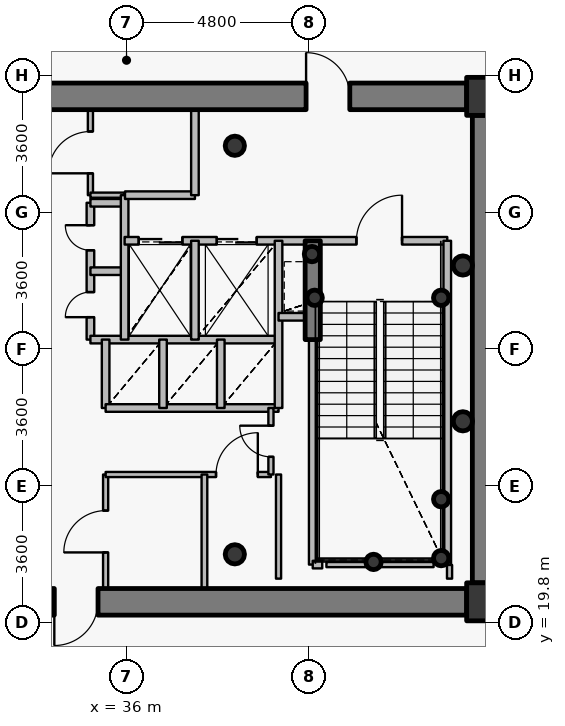
"""IFC4 building model, lengths in metres.
Left out: names, types, materials, properties, quantities, classifications, styles, units other than length and angle.
Written with IfcOpenShell. Run it as: python <this file> out.ifc"""

import sys

from ifc_helpers import new_model, si_unit, direction, frame, frame_2d, origin, origin_2d, place, context, subcontext, project, spatial, rectangle, hollow_circle, extrude, source, transform, mapped, element, fill, save


model = new_model("IFC4")
c1 = context("Model", 3, precision=1e-05, world=origin(), true_north=direction((0.0, 1.0)))
c2 = subcontext(c1, "Body", "Model", "MODEL_VIEW")
j1 = project(units=[si_unit("LENGTHUNIT", "METRE"), si_unit("PLANEANGLEUNIT", "RADIAN")], contexts=[c1])
p1 = place(None, origin())
s1 = spatial("IfcSite", under=j1, at=p1, CompositionType="ELEMENT")
p2 = place(p1, origin())
s2 = spatial("IfcBuilding", under=s1, at=p2, CompositionType="ELEMENT")
p3 = place(p2, frame((0.0, 0.0, 244.05)))
s3 = spatial("IfcBuildingStorey", under=s2, at=p3, CompositionType="ELEMENT", Elevation=244.05)
for number, where, z_axis, x_axis in (
    (1, (45.45, 20.35, 0.0), (0.0, 0.0, 1.0), (1.0, 0.0, 0.0)),
    (2, (45.45, 33.65, 0.0), (0.0, 0.0, 1.0), (1.0, 0.0, 0.0)),
):
    element("IfcColumn", number, at=place(p3, frame(where, z_axis=z_axis, x_axis=x_axis)), inside=s3, PredefinedType="COLUMN", context=c2, shape_type="SweptSolid", body=[
        extrude(rectangle(XDim=1.0, YDim=1.0, at=origin_2d()), origin(), (0.0, 0.0, 1.0), 3.75),
    ])
for number, where, z_axis, x_axis in (
    (3, (38.85, 21.6, 0.0), (0.0, 0.0, 1.0), (1.0, 0.0, 0.0)),
    (4, (38.85, 32.35, 0.0), (0.0, 0.0, 1.0), (1.0, 0.0, 0.0)),
):
    element("IfcColumn", number, at=place(p3, frame(where, z_axis=z_axis, x_axis=x_axis)), inside=s3, PredefinedType="COLUMN", context=c2, shape_type="SweptSolid", body=[
        extrude(hollow_circle(Radius=0.254, WallThickness=0.02, at=origin_2d()), origin(), (0.0, 0.0, 1.0), 3.75),
    ])
for number, where, z_axis, x_axis in (
    (5, (44.28, 21.5, 0.0), (0.0, 0.0, 1.0), (1.0, 0.0, 0.0)),
    (6, (44.28, 23.05, 0.0), (0.0, 0.0, 1.0), (1.0, 0.0, 0.0)),
    (7, (42.5, 21.4, 0.0), (0.0, 0.0, 1.0), (1.0, 0.0, 0.0)),
    (8, (40.95, 28.35, 0.0), (0.0, 0.0, 1.0), (1.0, 0.0, 0.0)),
    (9, (44.28, 28.35, 0.0), (0.0, 0.0, 1.0), (1.0, 0.0, 0.0)),
    (10, (40.88, 29.5, 0.0), (0.0, 0.0, 1.0), (1.0, 0.0, 0.0)),
):
    element("IfcColumn", number, at=place(p3, frame(where, z_axis=z_axis, x_axis=x_axis)), inside=s3, PredefinedType="COLUMN", context=c2, shape_type="SweptSolid", body=[
        extrude(hollow_circle(Radius=0.203, WallThickness=0.016, at=origin_2d()), origin(), (0.0, 0.0, 1.0), 3.75),
    ])
p4 = place(p3, frame((27.05, 33.65, 0.0), z_axis=(0.0, 0.0, 1.0), x_axis=(1.0, 0.0, 0.0)))
e11 = element("IfcWall", 11, at=p4, inside=s3, PredefinedType="SHEAR", context=c2, shape_type="SweptSolid", body=[
    extrude(rectangle(XDim=17.9, YDim=0.7, at=frame_2d((8.95, 0.0))), origin(), (0.0, 0.0, 1.0), 3.05),
])
p5 = place(p4, frame((13.675, 0.0, 0.0)))
e12 = element("IfcOpeningElement", 12, at=p5, cuts=e11, PredefinedType="OPENING", context=c2, shape_type="SweptSolid", body=[
    extrude(rectangle(XDim=1.15, YDim=2.15, at=origin_2d()), frame((0.575, 0.36, 1.075), z_axis=(0.0, -1.0, 0.0), x_axis=(1.0, 0.0, 0.0)), (0.0, 0.0, 1.0), 0.72),
])
p6 = place(p3, frame((45.45, 33.15, 0.0), z_axis=(0.0, 0.0, 1.0), x_axis=(0.0, -1.0, 0.0)))
e13 = element("IfcWall", 13, at=p6, inside=s3, PredefinedType="SHEAR", context=c2, shape_type="SweptSolid", body=[
    extrude(rectangle(XDim=12.3, YDim=0.7, at=frame_2d((6.15, 0.0))), origin(), (0.0, 0.0, 1.0), 3.05),
])
p7 = place(p3, frame((44.95, 20.35, 0.0), z_axis=(0.0, 0.0, 1.0), x_axis=(-1.0, 0.0, 0.0)))
e14 = element("IfcWall", 14, at=p7, inside=s3, PredefinedType="SHEAR", context=c2, shape_type="SweptSolid", body=[
    extrude(rectangle(XDim=17.9, YDim=0.7, at=frame_2d((8.95, 0.0))), origin(), (0.0, 0.0, 1.0), 3.05),
])
p8 = place(p7, frame((9.7, 0.0, 0.0)))
e15 = element("IfcOpeningElement", 15, at=p8, cuts=e14, PredefinedType="OPENING", context=c2, shape_type="SweptSolid", body=[
    extrude(rectangle(XDim=1.15, YDim=2.15, at=origin_2d()), frame((0.575, 0.36, 1.075), z_axis=(0.0, -1.0, 0.0), x_axis=(1.0, 0.0, 0.0)), (0.0, 0.0, 1.0), 0.72),
])
p9 = place(p3, frame((40.9, 27.25, 0.0), z_axis=(0.0, 0.0, 1.0), x_axis=(0.0, 1.0, 0.0)))
e16 = element("IfcWall", 16, at=p9, inside=s3, PredefinedType="SHEAR", context=c2, shape_type="SweptSolid", body=[
    extrude(rectangle(XDim=2.6, YDim=0.4, at=frame_2d((1.3, 0.0))), origin(), (0.0, 0.0, 1.0), 3.1),
])
for number, where, z_axis, x_axis in (
    (17, (44.85, 25.1, 0.0), (0.0, 0.0, 1.0), (1.0, 0.0, 0.0)),
    (18, (44.85, 29.2, 0.0), (0.0, 0.0, 1.0), (1.0, 0.0, 0.0)),
):
    element("IfcColumn", number, at=place(p3, frame(where, z_axis=z_axis, x_axis=x_axis)), inside=s3, PredefinedType="COLUMN", context=c2, shape_type="SweptSolid", body=[
        extrude(hollow_circle(Radius=0.254, WallThickness=0.02, at=origin_2d()), origin(), (0.0, 0.0, 1.0), 3.75),
    ])
p10 = place(p3, frame((35.05, 27.25, 0.0), z_axis=(0.0, 0.0, 1.0), x_axis=(0.0, 1.0, 0.0)))
e19 = element("IfcWall", 19, at=p10, inside=s3, PredefinedType="PARTITIONING", context=c2, shape_type="SweptSolid", body=[
    extrude(rectangle(XDim=3.6, YDim=0.2, at=frame_2d((1.8, 0.0))), origin(), (0.0, 0.0, 1.0), 3.5),
])
p11 = place(p10, frame((0.59, 0.0, 0.0)))
e20 = element("IfcOpeningElement", 20, at=p11, cuts=e19, PredefinedType="OPENING", context=c2, shape_type="SweptSolid", body=[
    extrude(rectangle(XDim=0.66, YDim=2.05, at=origin_2d()), frame((0.33, 0.11, 1.025), z_axis=(0.0, -1.0, 0.0), x_axis=(1.0, 0.0, 0.0)), (0.0, 0.0, 1.0), 0.22),
])
p12 = place(p10, frame((2.35, 0.0, 0.0)))
e21 = element("IfcOpeningElement", 21, at=p12, cuts=e19, PredefinedType="OPENING", context=c2, shape_type="SweptSolid", body=[
    extrude(rectangle(XDim=0.66, YDim=2.05, at=origin_2d()), frame((0.33, 0.11, 1.025), z_axis=(0.0, -1.0, 0.0), x_axis=(1.0, 0.0, 0.0)), (0.0, 0.0, 1.0), 0.22),
])
p13 = place(p3, frame((35.05, 27.25, 0.0), z_axis=(0.0, 0.0, 1.0), x_axis=(1.0, 0.0, 0.0)))
e22 = element("IfcWall", 22, at=p13, inside=s3, PredefinedType="PARTITIONING", context=c2, shape_type="SweptSolid", body=[
    extrude(rectangle(XDim=4.95, YDim=0.2, at=frame_2d((2.475, 0.0))), origin(), (0.0, 0.0, 1.0), 3.085),
])
for number, where, z_axis, x_axis in (
    (23, (35.05, 29.05, 0.0), (0.0, 0.0, 1.0), (1.0, 0.0, 0.0)),
    (24, (35.05, 30.85, 0.0), (0.0, 0.0, 1.0), (1.0, 0.0, 0.0)),
):
    element("IfcWall", number, at=place(p3, frame(where, z_axis=z_axis, x_axis=x_axis)), inside=s3, PredefinedType="PARTITIONING", context=c2, shape_type="SweptSolid", body=[
        extrude(rectangle(XDim=0.9, YDim=0.2, at=frame_2d((0.45, 0.0))), origin(), (0.0, 0.0, 1.0), 3.5),
    ])
p14 = place(p3, frame((35.05, 31.05, 0.0), z_axis=(0.0, 0.0, 1.0), x_axis=(0.0, 1.0, 0.0)))
e25 = element("IfcWall", 25, at=p14, inside=s3, PredefinedType="PARTITIONING", context=c2, shape_type="SweptSolid", body=[
    extrude(rectangle(XDim=2.25, YDim=0.135, at=frame_2d((1.125, 0.0))), origin(), (0.0, 0.0, 1.0), 3.085),
])
p15 = place(p14, frame((0.575, 0.0, 0.0)))
e26 = element("IfcOpeningElement", 26, at=p15, cuts=e25, PredefinedType="OPENING", context=c2, shape_type="SweptSolid", body=[
    extrude(rectangle(XDim=1.1, YDim=2.15, at=origin_2d()), frame((0.55, 0.078, 1.075), z_axis=(0.0, -1.0, 0.0), x_axis=(1.0, 0.0, 0.0)), (0.0, 0.0, 1.0), 0.155),
])
p16 = place(p3, frame((35.05, 31.05, 0.0), z_axis=(0.0, 0.0, 1.0), x_axis=(1.0, 0.0, 0.0)))
e27 = element("IfcWall", 27, at=p16, inside=s3, PredefinedType="PARTITIONING", context=c2, shape_type="SweptSolid", body=[
    extrude(rectangle(XDim=0.9, YDim=0.135, at=frame_2d((0.45, 0.0))), origin(), (0.0, 0.0, 1.0), 3.5),
])
p17 = place(p3, frame((35.45, 20.7, 0.0), z_axis=(0.0, 0.0, 1.0), x_axis=(0.0, 1.0, 0.0)))
e28 = element("IfcWall", 28, at=p17, inside=s3, PredefinedType="PARTITIONING", context=c2, shape_type="SweptSolid", body=[
    extrude(rectangle(XDim=3.0, YDim=0.135, at=frame_2d((1.5, 0.0))), origin(), (0.0, 0.0, 1.0), 3.085),
])
p18 = place(p17, frame((0.95, 0.0, 0.0)))
e29 = element("IfcOpeningElement", 29, at=p18, cuts=e28, PredefinedType="OPENING", context=c2, shape_type="SweptSolid", body=[
    extrude(rectangle(XDim=1.1, YDim=2.15, at=origin_2d()), frame((0.55, 0.078, 1.075), z_axis=(0.0, -1.0, 0.0), x_axis=(1.0, 0.0, 0.0)), (0.0, 0.0, 1.0), 0.155),
])
p19 = place(p3, frame((35.45, 23.7, 0.0), z_axis=(0.0, 0.0, 1.0), x_axis=(1.0, 0.0, 0.0)))
e30 = element("IfcWall", 30, at=p19, inside=s3, PredefinedType="PARTITIONING", context=c2, shape_type="SweptSolid", body=[
    extrude(rectangle(XDim=4.35, YDim=0.135, at=frame_2d((2.175, 0.0))), origin(), (0.0, 0.0, 1.0), 3.085),
])
p20 = place(p19, frame((2.905, 0.0, 0.0)))
e31 = element("IfcOpeningElement", 31, at=p20, cuts=e30, PredefinedType="OPENING", context=c2, shape_type="SweptSolid", body=[
    extrude(rectangle(XDim=1.1, YDim=2.15, at=origin_2d()), frame((0.55, 0.078, 1.075), z_axis=(0.0, -1.0, 0.0), x_axis=(1.0, 0.0, 0.0)), (0.0, 0.0, 1.0), 0.155),
])
p21 = place(p3, frame((35.45, 25.45, 0.0), z_axis=(0.0, 0.0, 1.0), x_axis=(0.0, 1.0, 0.0)))
e32 = element("IfcWall", 32, at=p21, inside=s3, PredefinedType="PARTITIONING", context=c2, shape_type="SweptSolid", body=[
    extrude(rectangle(XDim=1.8, YDim=0.2, at=frame_2d((0.9, 0.0))), origin(), (0.0, 0.0, 1.0), 3.5),
])
p22 = place(p3, frame((35.45, 25.45, 0.0), z_axis=(0.0, 0.0, 1.0), x_axis=(1.0, 0.0, 0.0)))
e33 = element("IfcWall", 33, at=p22, inside=s3, PredefinedType="PARTITIONING", context=c2, shape_type="SweptSolid", body=[
    extrude(rectangle(XDim=4.55, YDim=0.2, at=frame_2d((2.275, 0.0))), origin(), (0.0, 0.0, 1.0), 3.085),
])
p23 = place(p3, frame((35.95, 27.25, 0.0), z_axis=(0.0, 0.0, 1.0), x_axis=(0.0, 1.0, 0.0)))
e34 = element("IfcWall", 34, at=p23, inside=s3, PredefinedType="PARTITIONING", context=c2, shape_type="SweptSolid", body=[
    extrude(rectangle(XDim=3.8, YDim=0.2, at=frame_2d((1.9, 0.0))), origin(), (0.0, 0.0, 1.0), 3.5),
])
p24 = place(p3, frame((35.95, 29.85, 0.0), z_axis=(0.0, 0.0, 1.0), x_axis=(1.0, 0.0, 0.0)))
e35 = element("IfcWall", 35, at=p24, inside=s3, PredefinedType="PARTITIONING", context=c2, shape_type="SweptSolid", body=[
    extrude(rectangle(XDim=8.49, YDim=0.2, at=frame_2d((4.245, 0.0))), origin(), (0.0, 0.0, 1.0), 3.085),
])
p25 = place(p24, frame((6.1, 0.0, 0.0)))
e36 = element("IfcOpeningElement", 36, at=p25, cuts=e35, PredefinedType="OPENING", context=c2, shape_type="SweptSolid", body=[
    extrude(rectangle(XDim=1.2, YDim=2.15, at=origin_2d()), frame((0.6, 0.11, 1.075), z_axis=(0.0, -1.0, 0.0), x_axis=(1.0, 0.0, 0.0)), (0.0, 0.0, 1.0), 0.22),
])
p26 = place(p24, frame((0.37, 0.0, 0.0)))
e37 = element("IfcOpeningElement", 37, at=p26, cuts=e35, PredefinedType="OPENING", context=c2, shape_type="SweptSolid", body=[
    extrude(rectangle(XDim=1.15, YDim=2.15, at=origin_2d()), frame((0.575, 0.11, 1.075), z_axis=(0.0, -1.0, 0.0), x_axis=(1.0, 0.0, 0.0)), (0.0, 0.0, 1.0), 0.22),
])
p27 = place(p24, frame((2.425, 0.0, 0.0)))
e38 = element("IfcOpeningElement", 38, at=p27, cuts=e35, PredefinedType="OPENING", context=c2, shape_type="SweptSolid", body=[
    extrude(rectangle(XDim=1.05, YDim=2.15, at=origin_2d()), frame((0.525, 0.11, 1.075), z_axis=(0.0, -1.0, 0.0), x_axis=(1.0, 0.0, 0.0)), (0.0, 0.0, 1.0), 0.22),
])
p28 = place(p3, frame((35.96, 31.05, 0.0), z_axis=(0.0, 0.0, 1.0), x_axis=(1.0, 0.0, 0.0)))
e39 = element("IfcWall", 39, at=p28, inside=s3, PredefinedType="PARTITIONING", context=c2, shape_type="SweptSolid", body=[
    extrude(rectangle(XDim=1.84, YDim=0.2, at=frame_2d((0.92, 0.0))), origin(), (0.0, 0.0, 1.0), 3.5),
])
p29 = place(p3, frame((36.96, 25.45, 0.0), z_axis=(0.0, 0.0, 1.0), x_axis=(0.0, 1.0, 0.0)))
e40 = element("IfcWall", 40, at=p29, inside=s3, PredefinedType="PARTITIONING", context=c2, shape_type="SweptSolid", body=[
    extrude(rectangle(XDim=1.8, YDim=0.2, at=frame_2d((0.9, 0.0))), origin(), (0.0, 0.0, 1.0), 3.5),
])
p30 = place(p3, frame((37.8, 27.25, 0.0), z_axis=(0.0, 0.0, 1.0), x_axis=(0.0, 1.0, 0.0)))
e41 = element("IfcWall", 41, at=p30, inside=s3, PredefinedType="PARTITIONING", context=c2, shape_type="SweptSolid", body=[
    extrude(rectangle(XDim=2.6, YDim=0.2, at=frame_2d((1.3, 0.0))), origin(), (0.0, 0.0, 1.0), 3.5),
])
p31 = place(p3, frame((37.8, 31.05, 0.0), z_axis=(0.0, 0.0, 1.0), x_axis=(0.0, 1.0, 0.0)))
e42 = element("IfcWall", 42, at=p31, inside=s3, PredefinedType="PARTITIONING", context=c2, shape_type="SweptSolid", body=[
    extrude(rectangle(XDim=2.25, YDim=0.2, at=frame_2d((1.125, 0.0))), origin(), (0.0, 0.0, 1.0), 3.085),
])
p32 = place(p3, frame((38.05, 20.18, 0.0), z_axis=(0.0, 0.0, 1.0), x_axis=(0.0, 1.0, 0.0)))
e43 = element("IfcWall", 43, at=p32, inside=s3, PredefinedType="PARTITIONING", context=c2, shape_type="SweptSolid", body=[
    extrude(rectangle(XDim=3.52, YDim=0.15, at=frame_2d((1.76, 0.0))), origin(), (0.0, 0.0, 1.0), 3.035),
])
p33 = place(p3, frame((38.48, 25.45, 0.0), z_axis=(0.0, 0.0, 1.0), x_axis=(0.0, 1.0, 0.0)))
e44 = element("IfcWall", 44, at=p33, inside=s3, PredefinedType="PARTITIONING", context=c2, shape_type="SweptSolid", body=[
    extrude(rectangle(XDim=1.8, YDim=0.2, at=frame_2d((0.9, 0.0))), origin(), (0.0, 0.0, 1.0), 3.5),
])
p34 = place(p3, frame((39.8, 23.7, 0.0), z_axis=(0.0, 0.0, 1.0), x_axis=(0.0, 1.0, 0.0)))
e45 = element("IfcWall", 45, at=p34, inside=s3, PredefinedType="PARTITIONING", context=c2, shape_type="SweptSolid", body=[
    extrude(rectangle(XDim=1.75, YDim=0.135, at=frame_2d((0.875, 0.0))), origin(), (0.0, 0.0, 1.0), 3.5),
])
p35 = place(p34, frame((0.465, 0.0, 0.0)))
e46 = element("IfcOpeningElement", 46, at=p35, cuts=e45, PredefinedType="OPENING", context=c2, shape_type="SweptSolid", body=[
    extrude(rectangle(XDim=0.82, YDim=2.1, at=origin_2d()), frame((0.41, 0.078, 1.05), z_axis=(0.0, -1.0, 0.0), x_axis=(1.0, 0.0, 0.0)), (0.0, 0.0, 1.0), 0.155),
])
p36 = place(p3, frame((40.0, 25.45, 0.0), z_axis=(0.0, 0.0, 1.0), x_axis=(0.0, 1.0, 0.0)))
e47 = element("IfcWall", 47, at=p36, inside=s3, PredefinedType="PARTITIONING", context=c2, shape_type="SweptSolid", body=[
    extrude(rectangle(XDim=4.4, YDim=0.2, at=frame_2d((2.2, 0.0))), origin(), (0.0, 0.0, 1.0), 3.5),
])
p37 = place(p3, frame((40.0, 27.85, 0.0), z_axis=(0.0, 0.0, 1.0), x_axis=(1.0, 0.0, 0.0)))
e48 = element("IfcWall", 48, at=p37, inside=s3, PredefinedType="PARTITIONING", context=c2, shape_type="SweptSolid", body=[
    extrude(rectangle(XDim=0.9, YDim=0.2, at=frame_2d((0.45, 0.0))), origin(), (0.0, 0.0, 1.0), 3.5),
])
p38 = place(p3, frame((40.9, 21.33, 0.0), z_axis=(0.0, 0.0, 1.0), x_axis=(0.0, 1.0, 0.0)))
e49 = element("IfcWall", 49, at=p38, inside=s3, PredefinedType="PARTITIONING", context=c2, shape_type="SweptSolid", body=[
    extrude(rectangle(XDim=5.91, YDim=0.2, at=frame_2d((2.955, 0.0))), origin(), (0.0, 0.0, 1.0), 3.035),
])
p39 = place(p3, frame((40.9, 21.33, 0.0), z_axis=(0.0, 0.0, 1.0), x_axis=(1.0, 0.0, 0.0)))
e50 = element("IfcWall", 50, at=p39, inside=s3, PredefinedType="PARTITIONING", context=c2, shape_type="SweptSolid", body=[
    extrude(rectangle(XDim=0.25, YDim=0.2, at=frame_2d((0.125, 0.0))), origin(), (0.0, 0.0, 1.0), 3.035),
])
p40 = place(p3, frame((44.44, 21.33, 0.0), z_axis=(0.0, 0.0, 1.0), x_axis=(0.0, 1.0, 0.0)))
e51 = element("IfcWall", 51, at=p40, inside=s3, PredefinedType="PARTITIONING", context=c2, shape_type="SweptSolid", body=[
    extrude(rectangle(XDim=8.52, YDim=0.2, at=frame_2d((4.26, 0.0))), origin(), (0.0, 0.0, 1.0), 3.5),
])
p41 = place(p3, frame((44.08, 21.33, 0.0), z_axis=(0.0, 0.0, 1.0), x_axis=(-1.0, 0.0, 0.0)))
e52 = element("IfcWall", 52, at=p41, inside=s3, PredefinedType="PARTITIONING", context=c2, shape_type="SweptSolid", body=[
    extrude(rectangle(XDim=2.82, YDim=0.135, at=frame_2d((1.41, 0.0))), origin(), (0.0, 0.0, 1.0), 3.035),
])
p42 = place(p3, frame((40.0, 23.7, 0.0), z_axis=(0.0, 0.0, 1.0), x_axis=(0.0, -1.0, 0.0)))
e53 = element("IfcWall", 53, at=p42, inside=s3, PredefinedType="PARTITIONING", context=c2, shape_type="SweptSolid", body=[
    extrude(rectangle(XDim=2.74, YDim=0.135, at=frame_2d((1.37, 0.0))), origin(), (0.0, 0.0, 1.0), 3.035),
])
p43 = place(p3, frame((44.5, 20.96, 0.0), z_axis=(0.0, 0.0, 1.0), x_axis=(0.0, 1.0, 0.0)))
e54 = element("IfcWall", 54, at=p43, inside=s3, PredefinedType="PARTITIONING", context=c2, shape_type="SweptSolid", body=[
    extrude(rectangle(XDim=0.36, YDim=0.135, at=frame_2d((0.18, 0.0))), origin(), (0.0, 0.0, 1.0), 3.5),
])
for number, where, z_axis, x_axis in (
    (55, (45.79, 34.0, 0.0), (0.0, 0.0, 1.0), (-1.0, 0.0, 0.0)),
    (56, (44.96, 20.0, 0.0), (0.0, 0.0, 1.0), (1.0, 0.0, 0.0)),
):
    element("IfcWall", number, at=place(p3, frame(where, z_axis=z_axis, x_axis=x_axis)), inside=s3, PredefinedType="PARTITIONING", context=c2, shape_type="SweptSolid", body=[
        extrude(rectangle(XDim=0.83, YDim=0.135, at=frame_2d((0.415, 0.0))), origin(), (0.0, 0.0, 1.0), 2.935),
    ])
m1 = source(origin(), c2, "Body", "SweptSolid", [
    extrude(rectangle(XDim=1.15, YDim=2.15, at=origin_2d()), frame((0.575, 0.025, 1.075), z_axis=(0.0, -1.0, 0.0), x_axis=(1.0, 0.0, 0.0)), (0.0, 0.0, 1.0), 0.05),
])
p44 = place(p5, origin())
e57 = element("IfcDoor", 57, at=p44, inside=s3, OperationType="SINGLE_SWING_LEFT", PredefinedType="DOOR", context=c2, shape_type="MappedRepresentation", body=[
    mapped(m1, transform((0.0, 0.0, 0.0), x_axis=(1.0, 0.0, 0.0), y_axis=(0.0, 1.0, 0.0), z_axis=(0.0, 0.0, 1.0), scale=1.0)),
])
fill(e12, e57)
p45 = place(p8, origin())
e58 = element("IfcDoor", 58, at=p45, inside=s3, OperationType="SINGLE_SWING_RIGHT", PredefinedType="DOOR", context=c2, shape_type="MappedRepresentation", body=[
    mapped(m1, transform((0.0, 0.0, 0.0), x_axis=(1.0, 0.0, 0.0), y_axis=(0.0, 1.0, 0.0), z_axis=(0.0, 0.0, 1.0), scale=1.0)),
])
fill(e15, e58)
m2 = source(origin(), c2, "Body", "SweptSolid", [
    extrude(rectangle(XDim=1.2, YDim=2.15, at=origin_2d()), frame((0.6, 0.025, 1.075), z_axis=(0.0, -1.0, 0.0), x_axis=(1.0, 0.0, 0.0)), (0.0, 0.0, 1.0), 0.05),
])
p46 = place(p25, origin())
e59 = element("IfcDoor", 59, at=p46, inside=s3, OperationType="SINGLE_SWING_RIGHT", PredefinedType="DOOR", context=c2, shape_type="MappedRepresentation", body=[
    mapped(m2, transform((0.0, 0.0, 0.0), x_axis=(1.0, 0.0, 0.0), y_axis=(0.0, 1.0, 0.0), z_axis=(0.0, 0.0, 1.0), scale=1.0)),
])
fill(e36, e59)
m3 = source(origin(), c2, "Body", "SweptSolid", [
    extrude(rectangle(XDim=1.15, YDim=2.15, at=origin_2d()), frame((0.575, 0.025, 1.075), z_axis=(0.0, -1.0, 0.0), x_axis=(1.0, 0.0, 0.0)), (0.0, 0.0, 1.0), 0.05),
])
p47 = place(p26, origin())
e60 = element("IfcDoor", 60, at=p47, inside=s3, OperationType="DOUBLE_DOOR_SLIDING", PredefinedType="USERDEFINED", context=c2, shape_type="MappedRepresentation", body=[
    mapped(m3, transform((0.0, 0.0, 0.0), x_axis=(1.0, 0.0, 0.0), y_axis=(0.0, 1.0, 0.0), z_axis=(0.0, 0.0, 1.0), scale=1.0)),
])
fill(e37, e60)
m4 = source(origin(), c2, "Body", "SweptSolid", [
    extrude(rectangle(XDim=1.05, YDim=2.15, at=origin_2d()), frame((0.525, 0.025, 1.075), z_axis=(0.0, -1.0, 0.0), x_axis=(1.0, 0.0, 0.0)), (0.0, 0.0, 1.0), 0.05),
])
p48 = place(p27, origin())
e61 = element("IfcDoor", 61, at=p48, inside=s3, OperationType="DOUBLE_DOOR_SLIDING", PredefinedType="USERDEFINED", context=c2, shape_type="MappedRepresentation", body=[
    mapped(m4, transform((0.0, 0.0, 0.0), x_axis=(1.0, 0.0, 0.0), y_axis=(0.0, 1.0, 0.0), z_axis=(0.0, 0.0, 1.0), scale=1.0)),
])
fill(e38, e61)
m5 = source(origin(), c2, "Body", "SweptSolid", [
    extrude(rectangle(XDim=0.66, YDim=2.05, at=origin_2d()), frame((0.33, 0.025, 1.025), z_axis=(0.0, -1.0, 0.0), x_axis=(1.0, 0.0, 0.0)), (0.0, 0.0, 1.0), 0.05),
])
p49 = place(p11, origin())
e62 = element("IfcDoor", 62, at=p49, inside=s3, OperationType="SINGLE_SWING_LEFT", PredefinedType="USERDEFINED", context=c2, shape_type="MappedRepresentation", body=[
    mapped(m5, transform((0.0, 0.0, 0.0), x_axis=(1.0, 0.0, 0.0), y_axis=(0.0, 1.0, 0.0), z_axis=(0.0, 0.0, 1.0), scale=1.0)),
])
fill(e20, e62)
p50 = place(p12, origin())
e63 = element("IfcDoor", 63, at=p50, inside=s3, OperationType="SINGLE_SWING_RIGHT", PredefinedType="USERDEFINED", context=c2, shape_type="MappedRepresentation", body=[
    mapped(m5, transform((0.0, 0.0, 0.0), x_axis=(1.0, 0.0, 0.0), y_axis=(0.0, 1.0, 0.0), z_axis=(0.0, 0.0, 1.0), scale=1.0)),
])
fill(e21, e63)
m6 = source(origin(), c2, "Body", "SweptSolid", [
    extrude(rectangle(XDim=1.1, YDim=2.15, at=origin_2d()), frame((0.55, 0.025, 1.075), z_axis=(0.0, -1.0, 0.0), x_axis=(1.0, 0.0, 0.0)), (0.0, 0.0, 1.0), 0.05),
])
p51 = place(p18, origin())
e64 = element("IfcDoor", 64, at=p51, inside=s3, OperationType="SINGLE_SWING_LEFT", PredefinedType="DOOR", context=c2, shape_type="MappedRepresentation", body=[
    mapped(m6, transform((0.0, 0.0, 0.0), x_axis=(1.0, 0.0, 0.0), y_axis=(0.0, 1.0, 0.0), z_axis=(0.0, 0.0, 1.0), scale=1.0)),
])
fill(e29, e64)
p52 = place(p20, origin())
e65 = element("IfcDoor", 65, at=p52, inside=s3, OperationType="SINGLE_SWING_RIGHT", PredefinedType="DOOR", context=c2, shape_type="MappedRepresentation", body=[
    mapped(m6, transform((0.0, 0.0, 0.0), x_axis=(1.0, 0.0, 0.0), y_axis=(0.0, 1.0, 0.0), z_axis=(0.0, 0.0, 1.0), scale=1.0)),
])
fill(e31, e65)
p53 = place(p15, origin())
e66 = element("IfcDoor", 66, at=p53, inside=s3, OperationType="SINGLE_SWING_LEFT", PredefinedType="DOOR", context=c2, shape_type="MappedRepresentation", body=[
    mapped(m6, transform((0.0, 0.0, 0.0), x_axis=(1.0, 0.0, 0.0), y_axis=(0.0, 1.0, 0.0), z_axis=(0.0, 0.0, 1.0), scale=1.0)),
])
fill(e26, e66)
m7 = source(origin(), c2, "Body", "SweptSolid", [
    extrude(rectangle(XDim=0.82, YDim=2.1, at=origin_2d()), frame((0.41, 0.025, 1.05), z_axis=(0.0, -1.0, 0.0), x_axis=(1.0, 0.0, 0.0)), (0.0, 0.0, 1.0), 0.05),
])
p54 = place(p35, origin())
e67 = element("IfcDoor", 67, at=p54, inside=s3, OperationType="SINGLE_SWING_RIGHT", PredefinedType="DOOR", context=c2, shape_type="MappedRepresentation", body=[
    mapped(m7, transform((0.0, 0.0, 0.0), x_axis=(1.0, 0.0, 0.0), y_axis=(0.0, 1.0, 0.0), z_axis=(0.0, 0.0, 1.0), scale=1.0)),
])
fill(e46, e67)
save(model, sys.argv[1])
